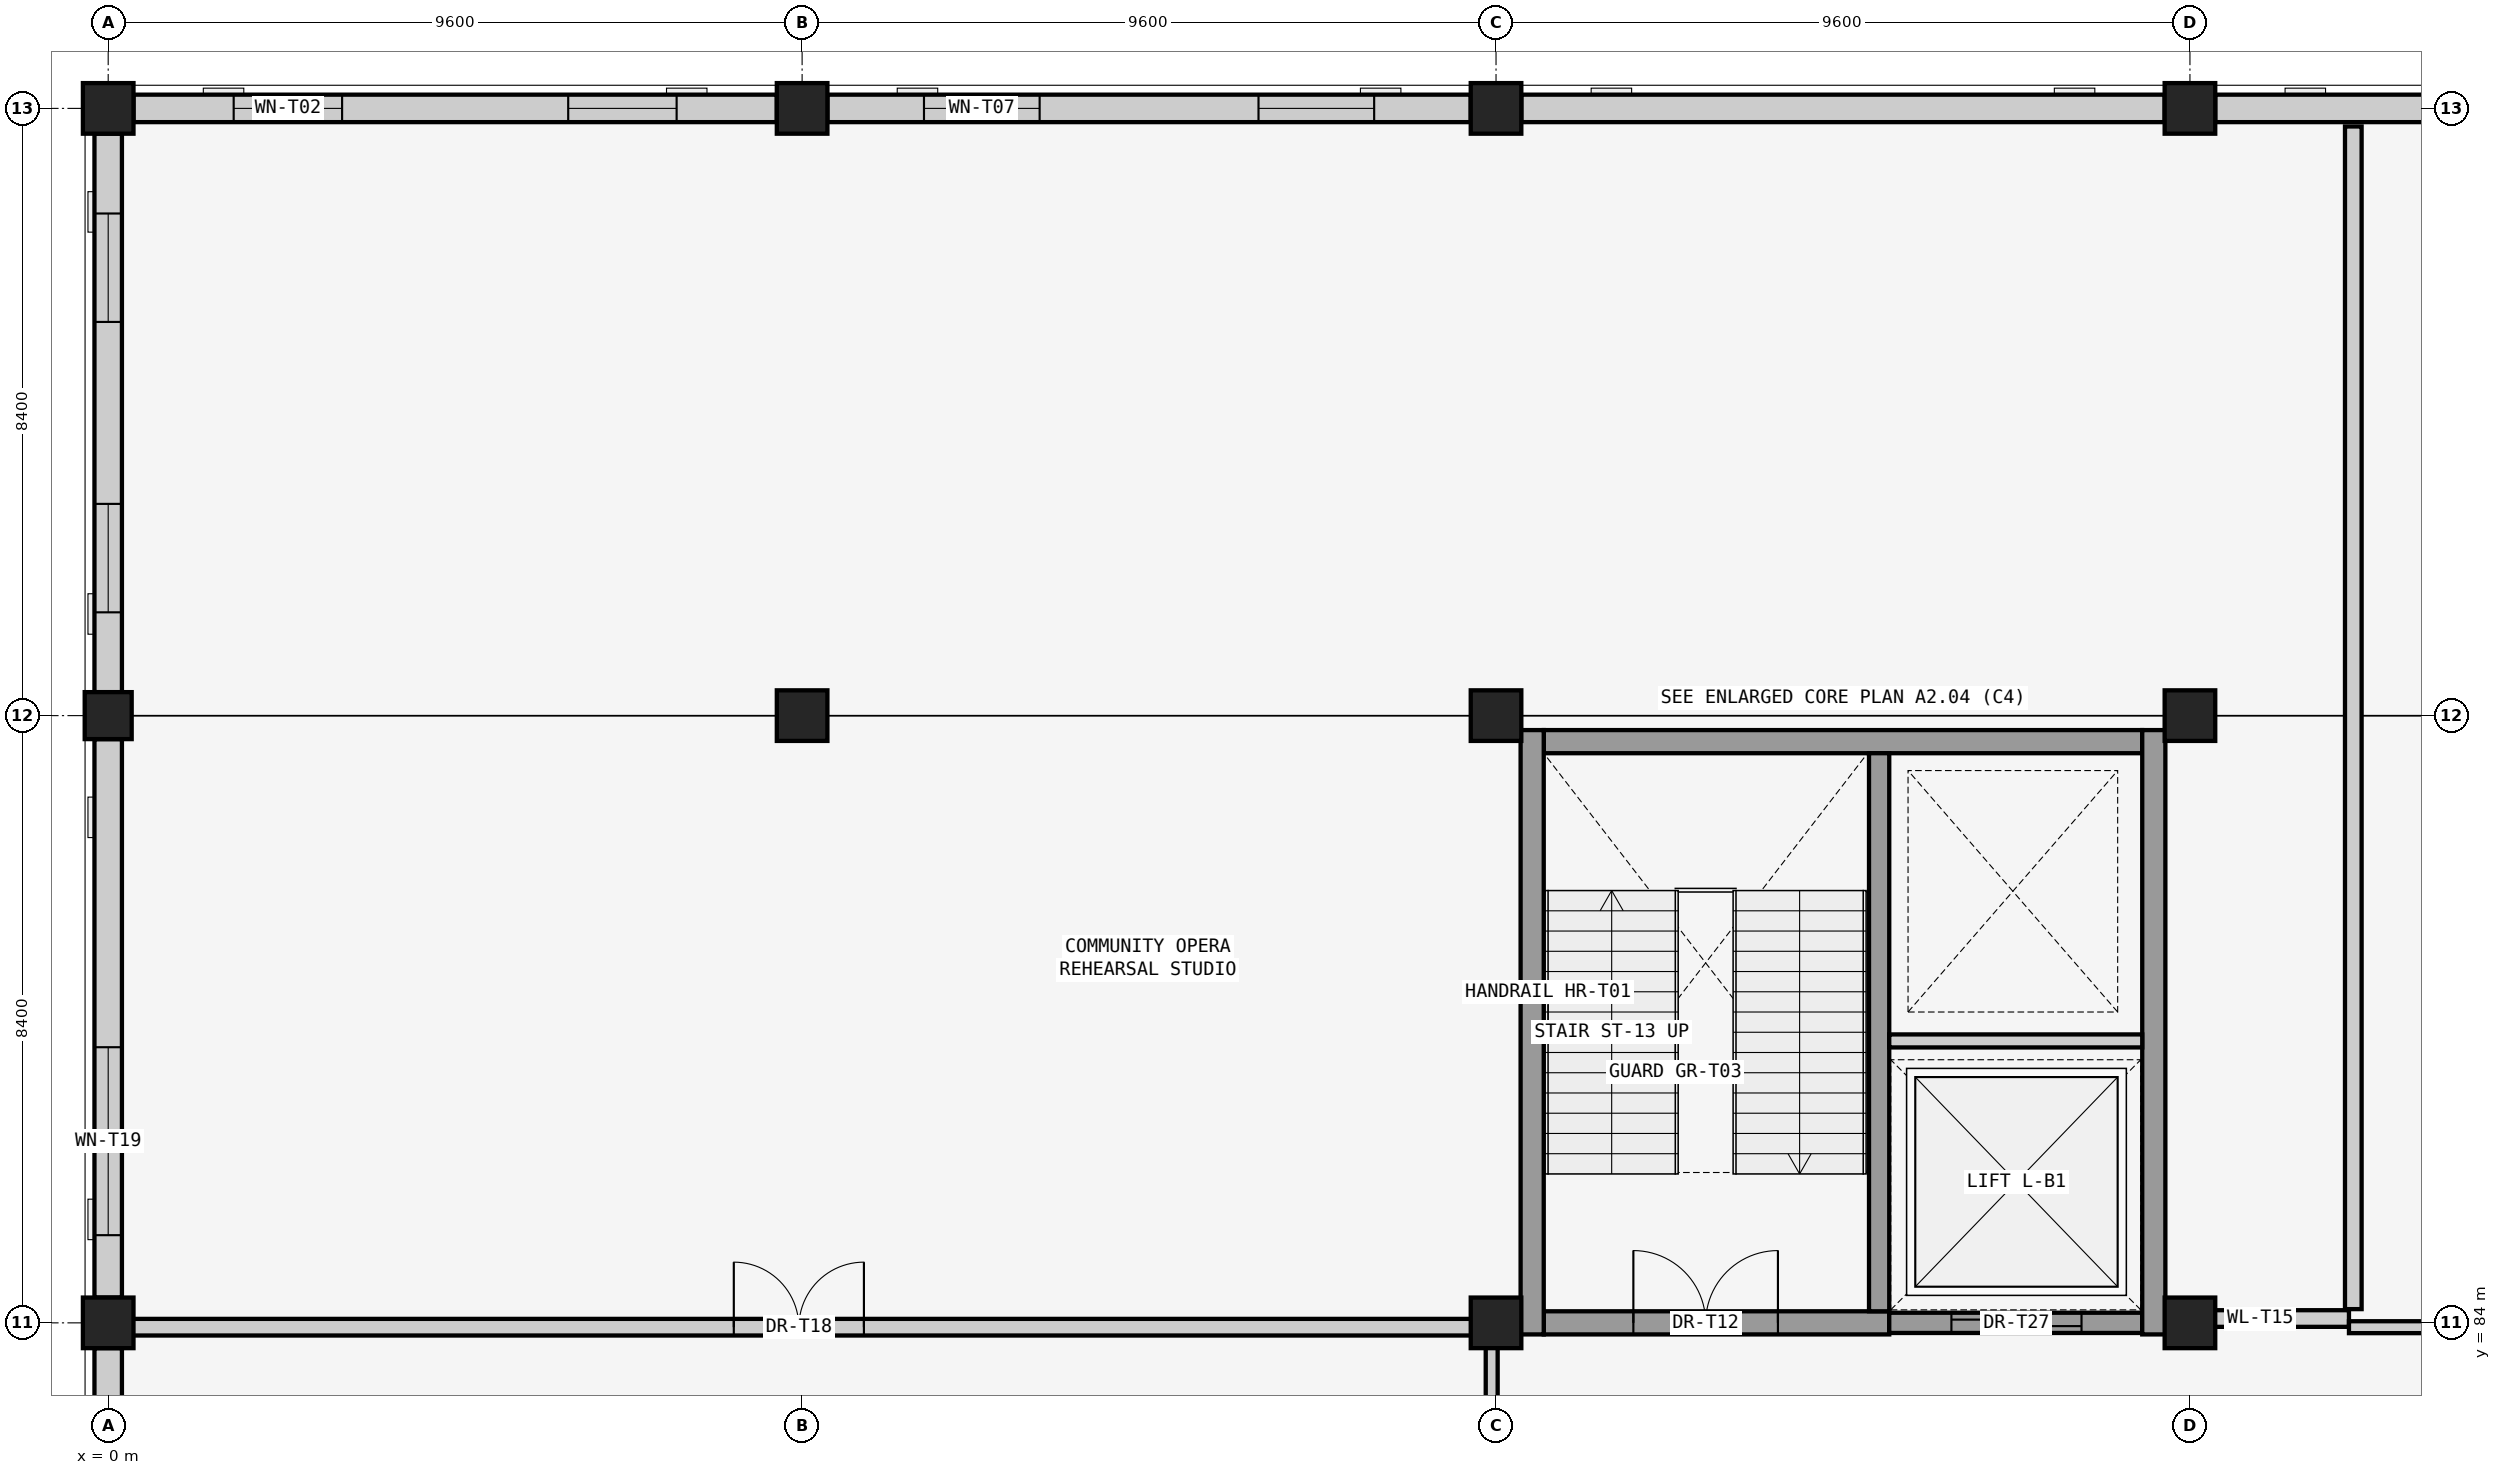
"""IFC4 building model, lengths in metres.
Left out: names, types, materials, properties, quantities, classifications, styles, units other than length and angle.
Written with IfcOpenShell. Run it as: python <this file> out.ifc"""

import sys

from ifc_helpers import new_model, si_unit, direction, frame, frame_2d, origin, origin_2d, place, context, subcontext, project, spatial, rectangle, extrude, element, fill, save


model = new_model("IFC4")
c1 = context("Model", 3, precision=1e-05, world=origin(), true_north=direction((0.0, 1.0)))
c2 = subcontext(c1, "Body", "Model", "MODEL_VIEW")
j1 = project(units=[si_unit("LENGTHUNIT", "METRE"), si_unit("PLANEANGLEUNIT", "RADIAN")], contexts=[c1])
p1 = place(None, origin())
s1 = spatial("IfcSite", under=j1, at=p1, CompositionType="ELEMENT")
p2 = place(p1, origin())
s2 = spatial("IfcBuilding", under=s1, at=p2, CompositionType="ELEMENT")
p3 = place(p2, origin())
s3 = spatial("IfcBuildingStorey", under=s2, at=p3, CompositionType="ELEMENT", Elevation=0.0)
p4 = place(p3, frame((0.0, 84.0, 0.0), z_axis=(0.0, 0.0, 1.0), x_axis=(1.0, 0.0, 0.0)))
e1 = element("IfcColumn", 1, at=p4, inside=s3, PredefinedType="COLUMN", context=c2, shape_type="SweptSolid", body=[
    extrude(rectangle(XDim=0.7, YDim=0.7, at=origin_2d()), origin(), (0.0, 0.0, 1.0), 5.07),
])
p5 = place(p3, frame((0.0, 92.4, 0.0), z_axis=(0.0, 0.0, 1.0), x_axis=(1.0, 0.0, 0.0)))
e2 = element("IfcColumn", 2, at=p5, inside=s3, PredefinedType="PILASTER", context=c2, shape_type="SweptSolid", body=[
    extrude(rectangle(XDim=0.65, YDim=0.65, at=origin_2d()), origin(), (0.0, 0.0, 1.0), 5.07),
])
for number, where, z_axis, x_axis in (
    (3, (0.0, 100.8, 0.0), (0.0, 0.0, 1.0), (1.0, 0.0, 0.0)),
    (4, (9.6, 92.4, 0.0), (0.0, 0.0, 1.0), (1.0, 0.0, 0.0)),
    (5, (9.6, 100.8, 0.0), (0.0, 0.0, 1.0), (1.0, 0.0, 0.0)),
    (6, (19.2, 84.0, 0.0), (0.0, 0.0, 1.0), (1.0, 0.0, 0.0)),
    (7, (19.2, 92.4, 0.0), (0.0, 0.0, 1.0), (1.0, 0.0, 0.0)),
    (8, (19.2, 100.8, 0.0), (0.0, 0.0, 1.0), (1.0, 0.0, 0.0)),
    (9, (28.8, 84.0, 0.0), (0.0, 0.0, 1.0), (1.0, 0.0, 0.0)),
    (10, (28.8, 92.4, 0.0), (0.0, 0.0, 1.0), (1.0, 0.0, 0.0)),
    (11, (28.8, 100.8, 0.0), (0.0, 0.0, 1.0), (1.0, 0.0, 0.0)),
):
    element("IfcColumn", number, at=place(p3, frame(where, z_axis=z_axis, x_axis=x_axis)), inside=s3, PredefinedType="COLUMN", context=c2, shape_type="SweptSolid", body=[
        extrude(rectangle(XDim=0.7, YDim=0.7, at=origin_2d()), origin(), (0.0, 0.0, 1.0), 5.07),
    ])
p6 = place(p3, frame((0.0, 75.95, 0.0), z_axis=(0.0, 0.0, 1.0), x_axis=(0.0, 1.0, 0.0)))
e12 = element("IfcWall", 12, at=p6, inside=s3, PredefinedType="SOLIDWALL", context=c2, shape_type="SweptSolid", body=[
    extrude(rectangle(XDim=7.7, YDim=0.38, at=frame_2d((3.85, 0.0))), origin(), (0.0, 0.0, 1.0), 4.45),
])
p7 = place(p6, frame((1.173, 0.0, 0.85)))
e13 = element("IfcOpeningElement", 13, at=p7, cuts=e12, PredefinedType="OPENING", context=c2, shape_type="SweptSolid", body=[
    extrude(rectangle(XDim=1.35, YDim=2.6, at=frame_2d((0.675, 1.3))), frame((0.0, 0.2, 0.0), z_axis=(0.0, -1.0, 0.0), x_axis=(1.0, 0.0, 0.0)), (0.0, 0.0, 1.0), 0.4),
])
p8 = place(p6, frame((5.177, 0.0, 0.85)))
e14 = element("IfcOpeningElement", 14, at=p8, cuts=e12, PredefinedType="OPENING", context=c2, shape_type="SweptSolid", body=[
    extrude(rectangle(XDim=1.35, YDim=2.6, at=frame_2d((0.675, 1.3))), frame((0.0, 0.2, 0.0), z_axis=(0.0, -1.0, 0.0), x_axis=(1.0, 0.0, 0.0)), (0.0, 0.0, 1.0), 0.4),
])
p9 = place(p3, frame((0.0, 84.35, 0.0), z_axis=(0.0, 0.0, 1.0), x_axis=(0.0, 1.0, 0.0)))
e15 = element("IfcWall", 15, at=p9, inside=s3, PredefinedType="SOLIDWALL", context=c2, shape_type="SweptSolid", body=[
    extrude(rectangle(XDim=7.725, YDim=0.38, at=frame_2d((3.862, 0.0))), origin(), (0.0, 0.0, 1.0), 4.45),
])
p10 = place(p9, frame((0.863, 0.0, 1.82)))
e16 = element("IfcOpeningElement", 16, at=p10, cuts=e15, PredefinedType="OPENING", context=c2, shape_type="SweptSolid", body=[
    extrude(rectangle(XDim=2.6, YDim=1.7, at=frame_2d((1.3, 0.85))), frame((0.0, 0.2, 0.0), z_axis=(0.0, -1.0, 0.0), x_axis=(1.0, 0.0, 0.0)), (0.0, 0.0, 1.0), 0.4),
])
p11 = place(p3, frame((0.35, 100.8, 0.0), z_axis=(0.0, 0.0, 1.0), x_axis=(1.0, 0.0, 0.0)))
e17 = element("IfcWall", 17, at=p11, inside=s3, PredefinedType="SOLIDWALL", context=c2, shape_type="SweptSolid", body=[
    extrude(rectangle(XDim=8.9, YDim=0.38, at=frame_2d((4.45, 0.0))), origin(), (0.0, 0.0, 1.0), 4.45),
])
p12 = place(p11, frame((1.386, 0.0, 0.9)))
e18 = element("IfcOpeningElement", 18, at=p12, cuts=e17, PredefinedType="OPENING", context=c2, shape_type="SweptSolid", body=[
    extrude(rectangle(XDim=1.5, YDim=2.4, at=frame_2d((0.75, 1.2))), frame((0.0, 0.2, 0.0), z_axis=(0.0, -1.0, 0.0), x_axis=(1.0, 0.0, 0.0)), (0.0, 0.0, 1.0), 0.4),
])
p13 = place(p11, frame((6.014, 0.0, 0.9)))
e19 = element("IfcOpeningElement", 19, at=p13, cuts=e17, PredefinedType="OPENING", context=c2, shape_type="SweptSolid", body=[
    extrude(rectangle(XDim=1.5, YDim=2.4, at=frame_2d((0.75, 1.2))), frame((0.0, 0.2, 0.0), z_axis=(0.0, -1.0, 0.0), x_axis=(1.0, 0.0, 0.0)), (0.0, 0.0, 1.0), 0.4),
])
p14 = place(p3, frame((0.0, 92.725, 0.0), z_axis=(0.0, 0.0, 1.0), x_axis=(0.0, 1.0, 0.0)))
e20 = element("IfcWall", 20, at=p14, inside=s3, PredefinedType="SOLIDWALL", context=c2, shape_type="SweptSolid", body=[
    extrude(rectangle(XDim=7.725, YDim=0.38, at=frame_2d((3.862, 0.0))), origin(), (0.0, 0.0, 1.0), 4.45),
])
p15 = place(p14, frame((1.104, 0.0, 0.9)))
e21 = element("IfcOpeningElement", 21, at=p15, cuts=e20, PredefinedType="OPENING", context=c2, shape_type="SweptSolid", body=[
    extrude(rectangle(XDim=1.5, YDim=2.4, at=frame_2d((0.75, 1.2))), frame((0.0, 0.2, 0.0), z_axis=(0.0, -1.0, 0.0), x_axis=(1.0, 0.0, 0.0)), (0.0, 0.0, 1.0), 0.4),
])
p16 = place(p14, frame((5.121, 0.0, 0.9)))
e22 = element("IfcOpeningElement", 22, at=p16, cuts=e20, PredefinedType="OPENING", context=c2, shape_type="SweptSolid", body=[
    extrude(rectangle(XDim=1.5, YDim=2.4, at=frame_2d((0.75, 1.2))), frame((0.0, 0.2, 0.0), z_axis=(0.0, -1.0, 0.0), x_axis=(1.0, 0.0, 0.0)), (0.0, 0.0, 1.0), 0.4),
])
p17 = place(p3, frame((9.95, 100.8, 0.0), z_axis=(0.0, 0.0, 1.0), x_axis=(1.0, 0.0, 0.0)))
e23 = element("IfcWall", 23, at=p17, inside=s3, PredefinedType="SOLIDWALL", context=c2, shape_type="SweptSolid", body=[
    extrude(rectangle(XDim=8.9, YDim=0.38, at=frame_2d((4.45, 0.0))), origin(), (0.0, 0.0, 1.0), 4.45),
])
p18 = place(p17, frame((1.336, 0.0, 1.0)))
e24 = element("IfcOpeningElement", 24, at=p18, cuts=e23, PredefinedType="OPENING", context=c2, shape_type="SweptSolid", body=[
    extrude(rectangle(XDim=1.6, YDim=2.0, at=frame_2d((0.8, 1.0))), frame((0.0, 0.2, 0.0), z_axis=(0.0, -1.0, 0.0), x_axis=(1.0, 0.0, 0.0)), (0.0, 0.0, 1.0), 0.4),
])
p19 = place(p17, frame((5.964, 0.0, 1.0)))
e25 = element("IfcOpeningElement", 25, at=p19, cuts=e23, PredefinedType="OPENING", context=c2, shape_type="SweptSolid", body=[
    extrude(rectangle(XDim=1.6, YDim=2.0, at=frame_2d((0.8, 1.0))), frame((0.0, 0.2, 0.0), z_axis=(0.0, -1.0, 0.0), x_axis=(1.0, 0.0, 0.0)), (0.0, 0.0, 1.0), 0.4),
])
p20 = place(p3, frame((19.55, 100.8, 0.0), z_axis=(0.0, 0.0, 1.0), x_axis=(1.0, 0.0, 0.0)))
e26 = element("IfcWall", 26, at=p20, inside=s3, PredefinedType="SOLIDWALL", context=c2, shape_type="SweptSolid", body=[
    extrude(rectangle(XDim=8.9, YDim=0.38, at=frame_2d((4.45, 0.0))), origin(), (0.0, 0.0, 1.0), 4.45),
])
p21 = place(p3, frame((29.15, 100.8, 0.0), z_axis=(0.0, 0.0, 1.0), x_axis=(1.0, 0.0, 0.0)))
e27 = element("IfcWall", 27, at=p21, inside=s3, PredefinedType="SOLIDWALL", context=c2, shape_type="SweptSolid", body=[
    extrude(rectangle(XDim=8.9, YDim=0.38, at=frame_2d((4.45, 0.0))), origin(), (0.0, 0.0, 1.0), 4.45),
])
p22 = place(p3, frame((19.86, 84.0, 0.0), z_axis=(0.0, 0.0, 1.0), x_axis=(1.0, 0.0, 0.0)))
e28 = element("IfcWall", 28, at=p22, inside=s3, PredefinedType="SHEAR", context=c2, shape_type="SweptSolid", body=[
    extrude(rectangle(XDim=4.78, YDim=0.32, at=frame_2d((2.39, 0.0))), origin(), (0.0, 0.0, 1.0), 5.05),
])
p23 = place(p22, frame((1.24, 0.0, 0.0)))
e29 = element("IfcOpeningElement", 29, at=p23, cuts=e28, PredefinedType="OPENING", context=c2, shape_type="SweptSolid", body=[
    extrude(rectangle(XDim=2.0, YDim=2.2, at=frame_2d((1.0, 1.1))), frame((0.0, 0.17, 0.0), z_axis=(0.0, -1.0, 0.0), x_axis=(1.0, 0.0, 0.0)), (0.0, 0.0, 1.0), 0.34),
])
p24 = place(p3, frame((24.64, 84.0, 0.0), z_axis=(0.0, 0.0, 1.0), x_axis=(1.0, 0.0, 0.0)))
e30 = element("IfcWall", 30, at=p24, inside=s3, PredefinedType="SHEAR", context=c2, shape_type="SweptSolid", body=[
    extrude(rectangle(XDim=3.5, YDim=0.28, at=frame_2d((1.75, 0.0))), origin(), (0.0, 0.0, 1.0), 5.05),
])
p25 = place(p24, frame((0.86, 0.0, 0.0)))
e31 = element("IfcOpeningElement", 31, at=p25, cuts=e30, PredefinedType="OPENING", context=c2, shape_type="SweptSolid", body=[
    extrude(rectangle(XDim=1.8, YDim=2.4, at=frame_2d((0.9, 1.2))), frame((0.0, 0.15, 0.0), z_axis=(0.0, -1.0, 0.0), x_axis=(1.0, 0.0, 0.0)), (0.0, 0.0, 1.0), 0.3),
])
p26 = place(p3, frame((28.14, 92.04, 0.0), z_axis=(0.0, 0.0, 1.0), x_axis=(-1.0, 0.0, 0.0)))
e32 = element("IfcWall", 32, at=p26, inside=s3, PredefinedType="SHEAR", context=c2, shape_type="SweptSolid", body=[
    extrude(rectangle(XDim=8.28, YDim=0.32, at=frame_2d((4.14, 0.0))), origin(), (0.0, 0.0, 1.0), 5.05),
])
for number, where, z_axis, x_axis in (
    (33, (19.7, 92.2, 0.0), (0.0, 0.0, 1.0), (0.0, -1.0, 0.0)),
    (34, (28.3, 83.84, 0.0), (0.0, 0.0, 1.0), (0.0, 1.0, 0.0)),
):
    element("IfcWall", number, at=place(p3, frame(where, z_axis=z_axis, x_axis=x_axis)), inside=s3, PredefinedType="SHEAR", context=c2, shape_type="SweptSolid", body=[
        extrude(rectangle(XDim=8.36, YDim=0.32, at=frame_2d((4.18, 0.0))), origin(), (0.0, 0.0, 1.0), 5.05),
    ])
p27 = place(p3, frame((24.5, 84.16, 0.0), z_axis=(0.0, 0.0, 1.0), x_axis=(0.0, 1.0, 0.0)))
e35 = element("IfcWall", 35, at=p27, inside=s3, PredefinedType="SHEAR", context=c2, shape_type="SweptSolid", body=[
    extrude(rectangle(XDim=7.72, YDim=0.28, at=frame_2d((3.86, 0.0))), origin(), (0.0, 0.0, 1.0), 5.05),
])
p28 = place(p3, frame((24.64, 87.9, 0.0), z_axis=(0.0, 0.0, 1.0), x_axis=(1.0, 0.0, 0.0)))
e36 = element("IfcWall", 36, at=p28, inside=s3, PredefinedType="SOLIDWALL", context=c2, shape_type="SweptSolid", body=[
    extrude(rectangle(XDim=3.5, YDim=0.18, at=frame_2d((1.75, 0.0))), origin(), (0.0, 0.0, 1.0), 5.05),
])
p29 = place(p3, frame((28.55, 84.06, 0.0), z_axis=(0.0, 0.0, 1.0), x_axis=(1.0, 0.0, 0.0)))
e37 = element("IfcWall", 37, at=p29, inside=s3, PredefinedType="SOLIDWALL", context=c2, shape_type="SweptSolid", body=[
    extrude(rectangle(XDim=2.45, YDim=0.23, at=frame_2d((1.225, 0.0))), origin(), (0.0, 0.0, 1.0), 4.2),
])
p30 = place(p3, frame((31.0, 83.94, 0.0), z_axis=(0.0, 0.0, 1.0), x_axis=(1.0, 0.0, 0.0)))
e38 = element("IfcWall", 38, at=p30, inside=s3, PredefinedType="PARTITIONING", context=c2, shape_type="SweptSolid", body=[
    extrude(rectangle(XDim=3.6, YDim=0.165, at=frame_2d((1.8, 0.0))), origin(), (0.0, 0.0, 1.0), 4.2),
])
p31 = place(p3, frame((19.14, 80.4, 0.0), z_axis=(0.0, 0.0, 1.0), x_axis=(0.0, 1.0, 0.0)))
e39 = element("IfcWall", 39, at=p31, inside=s3, PredefinedType="PARTITIONING", context=c2, shape_type="SweptSolid", body=[
    extrude(rectangle(XDim=3.6, YDim=0.165, at=frame_2d((1.8, 0.0))), origin(), (0.0, 0.0, 1.0), 4.35),
])
p32 = place(p3, frame((31.06, 84.19, 0.0), z_axis=(0.0, 0.0, 1.0), x_axis=(0.0, 1.0, 0.0)))
e40 = element("IfcWall", 40, at=p32, inside=s3, PredefinedType="SOLIDWALL", context=c2, shape_type="SweptSolid", body=[
    extrude(rectangle(XDim=16.36, YDim=0.23, at=frame_2d((8.18, 0.0))), origin(), (0.0, 0.0, 1.0), 4.99),
])
p33 = place(p3, frame((0.22, 83.94, 0.0), z_axis=(0.0, 0.0, 1.0), x_axis=(1.0, 0.0, 0.0)))
e41 = element("IfcWall", 41, at=p33, inside=s3, PredefinedType="SOLIDWALL", context=c2, shape_type="SweptSolid", body=[
    extrude(rectangle(XDim=18.67, YDim=0.23, at=frame_2d((9.335, 0.0))), origin(), (0.0, 0.0, 1.0), 3.6),
])
p34 = place(p33, frame((8.435, 0.0, 0.0)))
e42 = element("IfcOpeningElement", 42, at=p34, cuts=e41, PredefinedType="OPENING", context=c2, shape_type="SweptSolid", body=[
    extrude(rectangle(XDim=1.8, YDim=2.4, at=frame_2d((0.9, 1.2))), frame((0.0, 0.125, 0.0), z_axis=(0.0, -1.0, 0.0), x_axis=(1.0, 0.0, 0.0)), (0.0, 0.0, 1.0), 0.25),
])
p35 = place(p10, origin())
e43 = element("IfcWindow", 43, at=p35, inside=s3, PartitioningType="SINGLE_PANEL", PredefinedType="WINDOW", context=c2, shape_type="SweptSolid", body=[
    extrude(rectangle(XDim=2.6, YDim=1.7, at=frame_2d((1.3, 0.85))), frame((0.0, 0.03, 0.0), z_axis=(0.0, -1.0, 0.0), x_axis=(1.0, 0.0, 0.0)), (0.0, 0.0, 1.0), 0.06),
])
fill(e16, e43)
p36 = place(p12, origin())
e44 = element("IfcWindow", 44, at=p36, inside=s3, PartitioningType="SINGLE_PANEL", PredefinedType="WINDOW", context=c2, shape_type="SweptSolid", body=[
    extrude(rectangle(XDim=1.5, YDim=2.4, at=frame_2d((0.75, 1.2))), frame((0.0, 0.03, 0.0), z_axis=(0.0, -1.0, 0.0), x_axis=(1.0, 0.0, 0.0)), (0.0, 0.0, 1.0), 0.06),
])
fill(e18, e44)
p37 = place(p13, origin())
e45 = element("IfcWindow", 45, at=p37, inside=s3, PartitioningType="SINGLE_PANEL", PredefinedType="WINDOW", context=c2, shape_type="SweptSolid", body=[
    extrude(rectangle(XDim=1.5, YDim=2.4, at=frame_2d((0.75, 1.2))), frame((0.0, 0.03, 0.0), z_axis=(0.0, -1.0, 0.0), x_axis=(1.0, 0.0, 0.0)), (0.0, 0.0, 1.0), 0.06),
])
fill(e19, e45)
p38 = place(p15, origin())
e46 = element("IfcWindow", 46, at=p38, inside=s3, PartitioningType="SINGLE_PANEL", PredefinedType="WINDOW", context=c2, shape_type="SweptSolid", body=[
    extrude(rectangle(XDim=1.5, YDim=2.4, at=frame_2d((0.75, 1.2))), frame((0.0, 0.03, 0.0), z_axis=(0.0, -1.0, 0.0), x_axis=(1.0, 0.0, 0.0)), (0.0, 0.0, 1.0), 0.06),
])
fill(e21, e46)
p39 = place(p16, origin())
e47 = element("IfcWindow", 47, at=p39, inside=s3, PartitioningType="SINGLE_PANEL", PredefinedType="WINDOW", context=c2, shape_type="SweptSolid", body=[
    extrude(rectangle(XDim=1.5, YDim=2.4, at=frame_2d((0.75, 1.2))), frame((0.0, 0.03, 0.0), z_axis=(0.0, -1.0, 0.0), x_axis=(1.0, 0.0, 0.0)), (0.0, 0.0, 1.0), 0.06),
])
fill(e22, e47)
p40 = place(p18, origin())
e48 = element("IfcWindow", 48, at=p40, inside=s3, PartitioningType="SINGLE_PANEL", PredefinedType="WINDOW", context=c2, shape_type="SweptSolid", body=[
    extrude(rectangle(XDim=1.6, YDim=2.0, at=frame_2d((0.8, 1.0))), frame((0.0, 0.03, 0.0), z_axis=(0.0, -1.0, 0.0), x_axis=(1.0, 0.0, 0.0)), (0.0, 0.0, 1.0), 0.06),
])
fill(e24, e48)
p41 = place(p19, origin())
e49 = element("IfcWindow", 49, at=p41, inside=s3, PartitioningType="SINGLE_PANEL", PredefinedType="WINDOW", context=c2, shape_type="SweptSolid", body=[
    extrude(rectangle(XDim=1.6, YDim=2.0, at=frame_2d((0.8, 1.0))), frame((0.0, 0.03, 0.0), z_axis=(0.0, -1.0, 0.0), x_axis=(1.0, 0.0, 0.0)), (0.0, 0.0, 1.0), 0.06),
])
fill(e25, e49)
p42 = place(p23, origin())
e50 = element("IfcDoor", 50, at=p42, inside=s3, OperationType="DOUBLE_SWING_LEFT", PredefinedType="DOOR", context=c2, shape_type="SweptSolid", body=[
    extrude(rectangle(XDim=2.0, YDim=2.2, at=frame_2d((1.0, 1.1))), frame((0.0, 0.025, 0.0), z_axis=(0.0, -1.0, 0.0), x_axis=(1.0, 0.0, 0.0)), (0.0, 0.0, 1.0), 0.05),
])
fill(e29, e50)
p43 = place(p25, origin())
e51 = element("IfcDoor", 51, at=p43, inside=s3, OperationType="SLIDING_TO_LEFT", PredefinedType="DOOR", context=c2, shape_type="SweptSolid", body=[
    extrude(rectangle(XDim=1.8, YDim=2.4, at=frame_2d((0.9, 1.2))), frame((0.0, 0.025, 0.0), z_axis=(0.0, -1.0, 0.0), x_axis=(1.0, 0.0, 0.0)), (0.0, 0.0, 1.0), 0.05),
])
fill(e31, e51)
p44 = place(p34, origin())
e52 = element("IfcDoor", 52, at=p44, inside=s3, OperationType="DOUBLE_SWING_LEFT", PredefinedType="DOOR", context=c2, shape_type="SweptSolid", body=[
    extrude(rectangle(XDim=1.8, YDim=2.4, at=frame_2d((0.9, 1.2))), frame((0.0, 0.025, 0.0), z_axis=(0.0, -1.0, 0.0), x_axis=(1.0, 0.0, 0.0)), (0.0, 0.0, 1.0), 0.05),
])
fill(e42, e52)
save(model, sys.argv[1])
